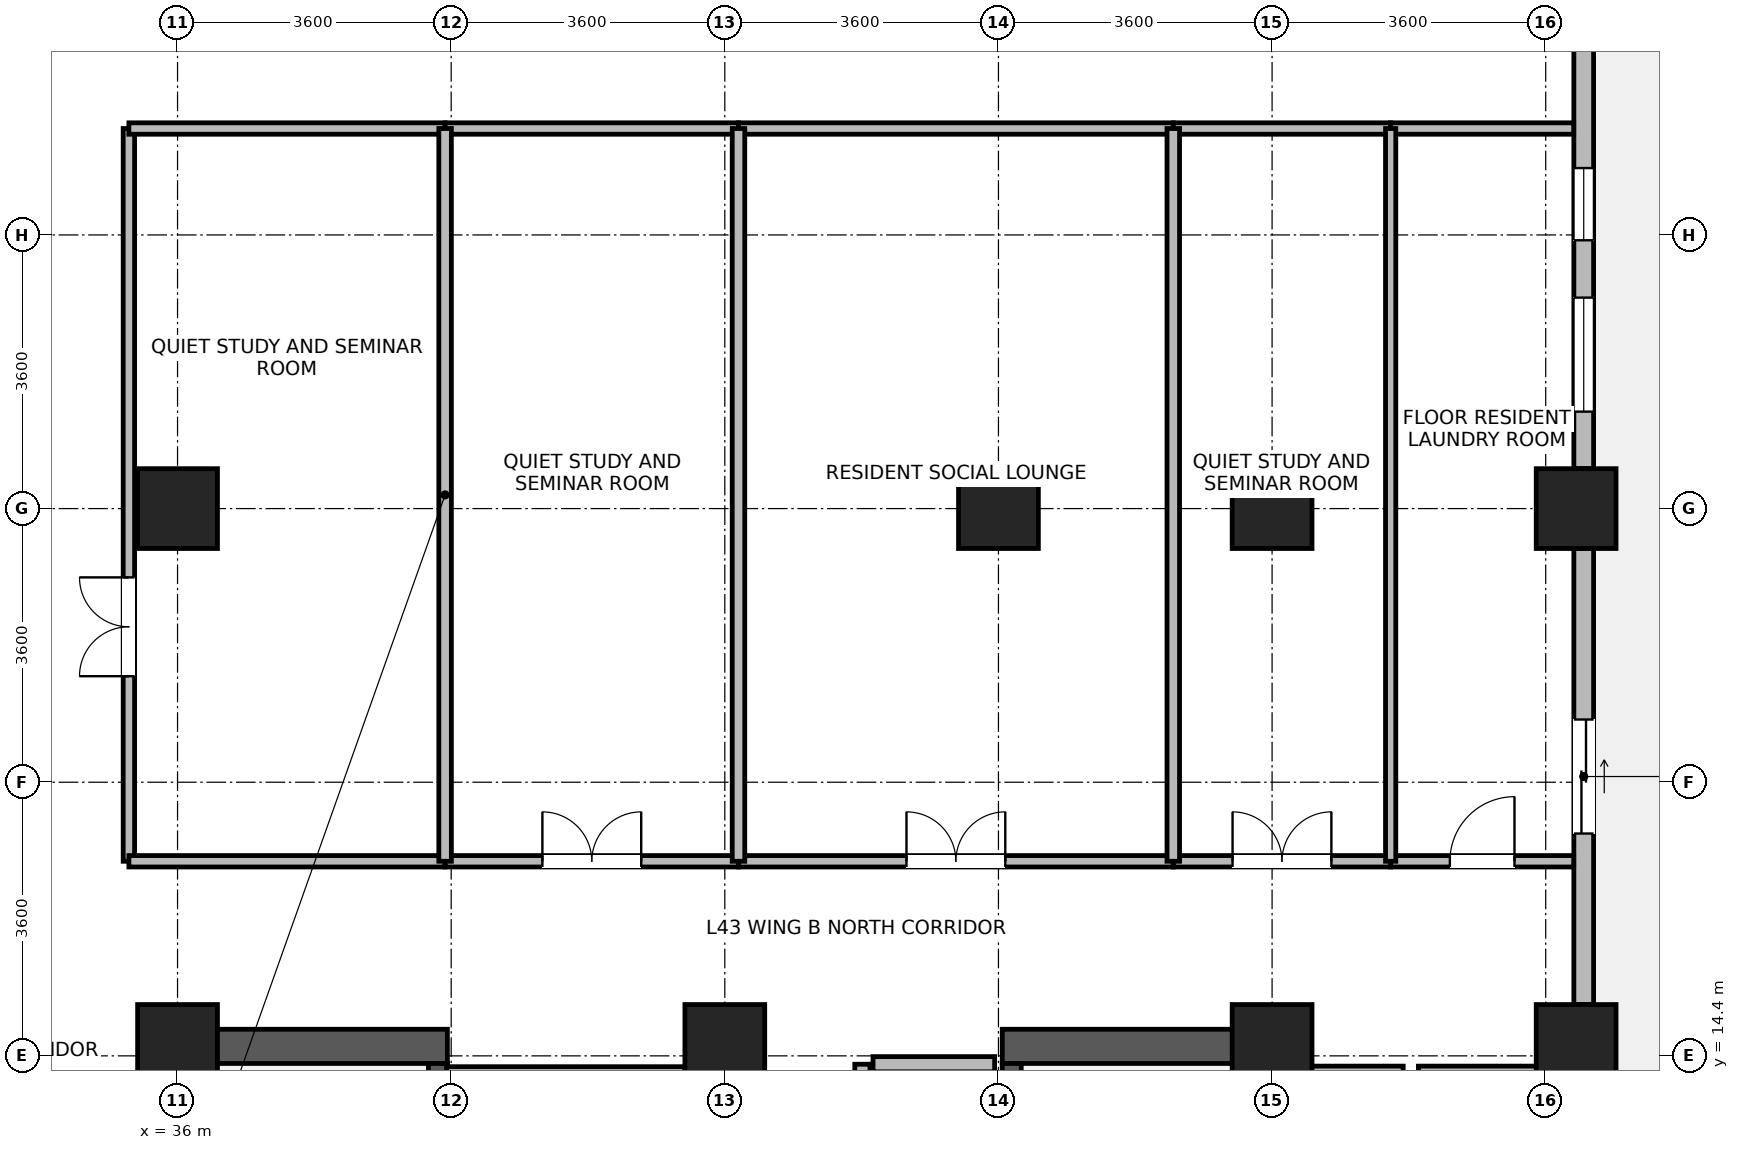
"""IFC4 building model, lengths in metres.
Left out: names, types, materials, properties, quantities, classifications, styles, units other than length and angle.
Written with IfcOpenShell. Run it as: python <this file> out.ifc"""

import sys

from ifc_helpers import new_model, si_unit, direction, frame, frame_2d, origin, origin_2d, place, context, subcontext, project, spatial, rectangle, extrude, source, transform, mapped, element, fill, save


model = new_model("IFC4")
c1 = context("Model", 3, precision=1e-05, world=origin(), true_north=direction((0.0, 1.0)))
c2 = subcontext(c1, "Body", "Model", "MODEL_VIEW")
j1 = project(units=[si_unit("LENGTHUNIT", "METRE"), si_unit("PLANEANGLEUNIT", "RADIAN")], contexts=[c1])
p1 = place(None, origin())
s1 = spatial("IfcSite", under=j1, at=p1, CompositionType="ELEMENT")
p2 = place(p1, origin())
s2 = spatial("IfcBuilding", under=s1, at=p2, CompositionType="ELEMENT")
p3 = place(p2, frame((0.0, 0.0, 169.8)))
s3 = spatial("IfcBuildingStorey", under=s2, at=p3, CompositionType="ELEMENT", Elevation=169.8)
for number, where, z_axis, x_axis in (
    (1, (36.125, 6.85, 0.0), (0.0, 0.0, 1.0), (0.0, 1.0, 0.0)),
    (2, (50.275, 6.85, 0.0), (0.0, 0.0, 1.0), (0.0, 1.0, 0.0)),
):
    element("IfcWall", number, at=place(p3, frame(where, z_axis=z_axis, x_axis=x_axis)), inside=s3, PredefinedType="SHEAR", context=c2, shape_type="SweptSolid", body=[
        extrude(rectangle(XDim=7.9, YDim=0.45, at=frame_2d((3.95, 0.0))), origin(), (0.0, 0.0, 1.0), 3.46),
    ])
for number, where, z_axis, x_axis in (
    (3, (36.35, 14.525, 0.0), (0.0, 0.0, 1.0), (1.0, 0.0, 0.0)),
    (4, (46.85, 14.525, 0.0), (0.0, 0.0, 1.0), (1.0, 0.0, 0.0)),
):
    element("IfcWall", number, at=place(p3, frame(where, z_axis=z_axis, x_axis=x_axis)), inside=s3, PredefinedType="SHEAR", context=c2, shape_type="SweptSolid", body=[
        extrude(rectangle(XDim=3.2, YDim=0.45, at=frame_2d((1.6, 0.0))), origin(), (0.0, 0.0, 1.0), 3.46),
    ])
p4 = place(p3, frame((39.425, 7.3, 0.0), z_axis=(0.0, 0.0, 1.0), x_axis=(0.0, 1.0, 0.0)))
e5 = element("IfcWall", 5, at=p4, inside=s3, PredefinedType="SHEAR", context=c2, shape_type="SweptSolid", body=[
    extrude(rectangle(XDim=7.0, YDim=0.25, at=frame_2d((3.5, 0.0))), origin(), (0.0, 0.0, 1.0), 3.46),
])
p5 = place(p4, frame((0.15, 0.0, 0.0)))
e6 = element("IfcOpeningElement", 6, at=p5, cuts=e5, PredefinedType="OPENING", context=c2, shape_type="SweptSolid", body=[
    extrude(rectangle(XDim=1.1, YDim=2.08, at=frame_2d((0.55, 1.04))), frame((0.0, 0.135, 0.0), z_axis=(0.0, -1.0, 0.0), x_axis=(1.0, 0.0, 0.0)), (0.0, 0.0, 1.0), 0.27),
])
p6 = place(p3, frame((46.975, 7.3, 0.0), z_axis=(0.0, 0.0, 1.0), x_axis=(0.0, 1.0, 0.0)))
e7 = element("IfcWall", 7, at=p6, inside=s3, PredefinedType="SHEAR", context=c2, shape_type="SweptSolid", body=[
    extrude(rectangle(XDim=7.0, YDim=0.25, at=frame_2d((3.5, 0.0))), origin(), (0.0, 0.0, 1.0), 3.46),
])
p7 = place(p6, frame((0.15, 0.0, 0.0)))
e8 = element("IfcOpeningElement", 8, at=p7, cuts=e7, PredefinedType="OPENING", context=c2, shape_type="SweptSolid", body=[
    extrude(rectangle(XDim=1.1, YDim=2.08, at=frame_2d((0.55, 1.04))), frame((0.0, 0.135, 0.0), z_axis=(0.0, -1.0, 0.0), x_axis=(1.0, 0.0, 0.0)), (0.0, 0.0, 1.0), 0.27),
])
m1 = source(origin(), c2, "Body", "SweptSolid", [
    extrude(rectangle(XDim=1.05, YDim=1.05, at=origin_2d()), origin(), (0.0, 0.0, 1.0), 3.7),
])
for number, where, z_axis, x_axis in (
    (9, (36.0, 21.6, 0.0), (0.0, 0.0, 1.0), (1.0, 0.0, 0.0)),
    (10, (46.8, 21.6, 0.0), (0.0, 0.0, 1.0), (1.0, 0.0, 0.0)),
    (11, (36.0, 14.55, 0.0), (0.0, 0.0, 1.0), (1.0, 0.0, 0.0)),
    (12, (43.2, 14.55, 0.0), (0.0, 0.0, 1.0), (1.0, 0.0, 0.0)),
    (13, (50.4, 14.55, 0.0), (0.0, 0.0, 1.0), (1.0, 0.0, 0.0)),
    (14, (50.4, 21.6, 0.0), (0.0, 0.0, 1.0), (1.0, 0.0, 0.0)),
    (15, (54.4, 14.55, 0.0), (0.0, 0.0, 1.0), (1.0, 0.0, 0.0)),
    (16, (54.4, 21.6, 0.0), (0.0, 0.0, 1.0), (1.0, 0.0, 0.0)),
):
    element("IfcColumn", number, at=place(p3, frame(where, z_axis=z_axis, x_axis=x_axis)), inside=s3, PredefinedType="COLUMN", context=c2, shape_type="MappedRepresentation", body=[
        mapped(m1, transform((0.0, 0.0, 0.0), x_axis=(1.0, 0.0, 0.0), y_axis=(0.0, 1.0, 0.0), z_axis=(0.0, 0.0, 1.0), scale=1.0)),
    ])
p8 = place(p3, frame((54.5, 21.074, 0.0), z_axis=(0.0, 0.0, 1.0), x_axis=(0.0, -1.0, 0.0)))
e17 = element("IfcWall", 17, at=p8, inside=s3, PredefinedType="STANDARD", context=c2, shape_type="SweptSolid", body=[
    extrude(rectangle(XDim=5.998, YDim=0.26, at=frame_2d((2.999, 0.0))), origin(), (0.0, 0.0, 1.0), 2.99),
])
p9 = place(p8, frame((2.249, 0.0, 0.0)))
e18 = element("IfcOpeningElement", 18, at=p9, cuts=e17, PredefinedType="OPENING", context=c2, shape_type="SweptSolid", body=[
    extrude(rectangle(XDim=1.5, YDim=2.15, at=frame_2d((0.75, 1.075))), frame((0.0, 0.14, 0.0), z_axis=(0.0, -1.0, 0.0), x_axis=(1.0, 0.0, 0.0)), (0.0, 0.0, 1.0), 0.28),
])
p10 = place(p3, frame((54.5, 28.124, 0.0), z_axis=(0.0, 0.0, 1.0), x_axis=(0.0, -1.0, 0.0)))
e19 = element("IfcWall", 19, at=p10, inside=s3, PredefinedType="STANDARD", context=c2, shape_type="SweptSolid", body=[
    extrude(rectangle(XDim=5.998, YDim=0.26, at=frame_2d((2.999, 0.0))), origin(), (0.0, 0.0, 1.0), 2.99),
])
p11 = place(p10, frame((3.749, 0.0, 0.85)))
e20 = element("IfcOpeningElement", 20, at=p11, cuts=e19, PredefinedType="OPENING", context=c2, shape_type="SweptSolid", body=[
    extrude(rectangle(XDim=1.5, YDim=1.85, at=frame_2d((0.75, 0.925))), frame((0.0, 0.14, 0.0), z_axis=(0.0, -1.0, 0.0), x_axis=(1.0, 0.0, 0.0)), (0.0, 0.0, 1.0), 0.28),
])
p12 = place(p10, frame((2.044, 0.0, 0.85)))
e21 = element("IfcOpeningElement", 21, at=p12, cuts=e19, PredefinedType="OPENING", context=c2, shape_type="SweptSolid", body=[
    extrude(rectangle(XDim=0.95, YDim=1.75, at=frame_2d((0.475, 0.875))), frame((0.0, 0.14, 0.0), z_axis=(0.0, -1.0, 0.0), x_axis=(1.0, 0.0, 0.0)), (0.0, 0.0, 1.0), 0.28),
])
p13 = place(p3, frame((50.475, 14.165, 0.0), z_axis=(0.0, 0.0, 1.0), x_axis=(1.0, 0.0, 0.0)))
e22 = element("IfcWall", 22, at=p13, inside=s3, PredefinedType="PARTITIONING", context=c2, shape_type="SweptSolid", body=[
    extrude(rectangle(XDim=1.65, YDim=0.2, at=frame_2d((0.825, 0.0))), origin(), (0.0, 0.0, 1.0), 3.44),
])
p14 = place(p3, frame((52.325, 14.165, 0.0), z_axis=(0.0, 0.0, 1.0), x_axis=(1.0, 0.0, 0.0)))
e23 = element("IfcWall", 23, at=p14, inside=s3, PredefinedType="PARTITIONING", context=c2, shape_type="SweptSolid", body=[
    extrude(rectangle(XDim=1.65, YDim=0.2, at=frame_2d((0.825, 0.0))), origin(), (0.0, 0.0, 1.0), 3.44),
])
p15 = place(p3, frame((45.15, 14.29, 0.0), z_axis=(0.0, 0.0, 1.0), x_axis=(1.0, 0.0, 0.0)))
e24 = element("IfcWall", 24, at=p15, inside=s3, PredefinedType="PARTITIONING", context=c2, shape_type="SweptSolid", body=[
    extrude(rectangle(XDim=1.6, YDim=0.2, at=frame_2d((0.8, 0.0))), origin(), (0.0, 0.0, 1.0), 2.44),
])
p16 = place(p3, frame((45.01, 11.61, 0.0), z_axis=(0.0, 0.0, 1.0), x_axis=(0.0, 1.0, 0.0)))
e25 = element("IfcWall", 25, at=p16, inside=s3, PredefinedType="PARTITIONING", context=c2, shape_type="SweptSolid", body=[
    extrude(rectangle(XDim=2.68, YDim=0.2, at=frame_2d((1.34, 0.0))), origin(), (0.0, 0.0, 1.0), 3.44),
])
p17 = place(p3, frame((35.36, 16.96, 0.0), z_axis=(0.0, 0.0, 1.0), x_axis=(0.0, 1.0, 0.0)))
e26 = element("IfcWall", 26, at=p17, inside=s3, PredefinedType="PARTITIONING", context=c2, shape_type="SweptSolid", body=[
    extrude(rectangle(XDim=9.64, YDim=0.15, at=frame_2d((4.82, 0.0))), origin(), (0.0, 0.0, 1.0), 3.44),
])
p18 = place(p17, frame((2.435, 0.0, 0.0)))
e27 = element("IfcOpeningElement", 27, at=p18, cuts=e26, PredefinedType="OPENING", context=c2, shape_type="SweptSolid", body=[
    extrude(rectangle(XDim=1.3, YDim=2.12, at=frame_2d((0.65, 1.06))), frame((0.0, 0.085, 0.0), z_axis=(0.0, -1.0, 0.0), x_axis=(1.0, 0.0, 0.0)), (0.0, 0.0, 1.0), 0.17),
])
p19 = place(p3, frame((43.38, 16.96, 0.0), z_axis=(0.0, 0.0, 1.0), x_axis=(1.0, 0.0, 0.0)))
e28 = element("IfcWall", 28, at=p19, inside=s3, PredefinedType="PARTITIONING", context=c2, shape_type="SweptSolid", body=[
    extrude(rectangle(XDim=5.72, YDim=0.15, at=frame_2d((2.86, 0.0))), origin(), (0.0, 0.0, 1.0), 3.44),
])
p20 = place(p19, frame((2.21, 0.0, 0.0)))
e29 = element("IfcOpeningElement", 29, at=p20, cuts=e28, PredefinedType="OPENING", context=c2, shape_type="SweptSolid", body=[
    extrude(rectangle(XDim=1.3, YDim=2.12, at=frame_2d((0.65, 1.06))), frame((0.0, 0.085, 0.0), z_axis=(0.0, -1.0, 0.0), x_axis=(1.0, 0.0, 0.0)), (0.0, 0.0, 1.0), 0.17),
])
p21 = place(p3, frame((43.38, 26.6, 0.0), z_axis=(0.0, 0.0, 1.0), x_axis=(1.0, 0.0, 0.0)))
e30 = element("IfcWall", 30, at=p21, inside=s3, PredefinedType="PARTITIONING", context=c2, shape_type="SweptSolid", body=[
    extrude(rectangle(XDim=5.72, YDim=0.15, at=frame_2d((2.86, 0.0))), origin(), (0.0, 0.0, 1.0), 3.44),
])
for number, where, z_axis, x_axis in (
    (31, (35.36, 16.96, 0.0), (0.0, 0.0, 1.0), (1.0, 0.0, 0.0)),
    (32, (35.36, 26.6, 0.0), (0.0, 0.0, 1.0), (1.0, 0.0, 0.0)),
):
    element("IfcWall", number, at=place(p3, frame(where, z_axis=z_axis, x_axis=x_axis)), inside=s3, PredefinedType="PARTITIONING", context=c2, shape_type="SweptSolid", body=[
        extrude(rectangle(XDim=4.16, YDim=0.15, at=frame_2d((2.08, 0.0))), origin(), (0.0, 0.0, 1.0), 3.44),
    ])
p22 = place(p3, frame((39.52, 16.96, 0.0), z_axis=(0.0, 0.0, 1.0), x_axis=(1.0, 0.0, 0.0)))
e33 = element("IfcWall", 33, at=p22, inside=s3, PredefinedType="PARTITIONING", context=c2, shape_type="SweptSolid", body=[
    extrude(rectangle(XDim=3.86, YDim=0.15, at=frame_2d((1.93, 0.0))), origin(), (0.0, 0.0, 1.0), 3.44),
])
p23 = place(p22, frame((1.28, 0.0, 0.0)))
e34 = element("IfcOpeningElement", 34, at=p23, cuts=e33, PredefinedType="OPENING", context=c2, shape_type="SweptSolid", body=[
    extrude(rectangle(XDim=1.3, YDim=2.12, at=frame_2d((0.65, 1.06))), frame((0.0, 0.085, 0.0), z_axis=(0.0, -1.0, 0.0), x_axis=(1.0, 0.0, 0.0)), (0.0, 0.0, 1.0), 0.17),
])
p24 = place(p3, frame((39.52, 26.6, 0.0), z_axis=(0.0, 0.0, 1.0), x_axis=(1.0, 0.0, 0.0)))
e35 = element("IfcWall", 35, at=p24, inside=s3, PredefinedType="PARTITIONING", context=c2, shape_type="SweptSolid", body=[
    extrude(rectangle(XDim=3.86, YDim=0.15, at=frame_2d((1.93, 0.0))), origin(), (0.0, 0.0, 1.0), 3.44),
])
p25 = place(p3, frame((49.1, 16.96, 0.0), z_axis=(0.0, 0.0, 1.0), x_axis=(1.0, 0.0, 0.0)))
e36 = element("IfcWall", 36, at=p25, inside=s3, PredefinedType="PARTITIONING", context=c2, shape_type="SweptSolid", body=[
    extrude(rectangle(XDim=2.86, YDim=0.15, at=frame_2d((1.43, 0.0))), origin(), (0.0, 0.0, 1.0), 3.44),
])
p26 = place(p25, frame((0.78, 0.0, 0.0)))
e37 = element("IfcOpeningElement", 37, at=p26, cuts=e36, PredefinedType="OPENING", context=c2, shape_type="SweptSolid", body=[
    extrude(rectangle(XDim=1.3, YDim=2.12, at=frame_2d((0.65, 1.06))), frame((0.0, 0.085, 0.0), z_axis=(0.0, -1.0, 0.0), x_axis=(1.0, 0.0, 0.0)), (0.0, 0.0, 1.0), 0.17),
])
p27 = place(p3, frame((49.1, 26.6, 0.0), z_axis=(0.0, 0.0, 1.0), x_axis=(1.0, 0.0, 0.0)))
e38 = element("IfcWall", 38, at=p27, inside=s3, PredefinedType="PARTITIONING", context=c2, shape_type="SweptSolid", body=[
    extrude(rectangle(XDim=2.86, YDim=0.15, at=frame_2d((1.43, 0.0))), origin(), (0.0, 0.0, 1.0), 3.44),
])
p28 = place(p3, frame((51.96, 16.96, 0.0), z_axis=(0.0, 0.0, 1.0), x_axis=(1.0, 0.0, 0.0)))
e39 = element("IfcWall", 39, at=p28, inside=s3, PredefinedType="PARTITIONING", context=c2, shape_type="SweptSolid", body=[
    extrude(rectangle(XDim=2.408, YDim=0.15, at=frame_2d((1.204, 0.0))), origin(), (0.0, 0.0, 1.0), 3.44),
])
p29 = place(p28, frame((0.779, 0.0, 0.0)))
e40 = element("IfcOpeningElement", 40, at=p29, cuts=e39, PredefinedType="OPENING", context=c2, shape_type="SweptSolid", body=[
    extrude(rectangle(XDim=0.85, YDim=2.04, at=frame_2d((0.425, 1.02))), frame((0.0, 0.085, 0.0), z_axis=(0.0, -1.0, 0.0), x_axis=(1.0, 0.0, 0.0)), (0.0, 0.0, 1.0), 0.17),
])
p30 = place(p3, frame((51.96, 26.6, 0.0), z_axis=(0.0, 0.0, 1.0), x_axis=(1.0, 0.0, 0.0)))
e41 = element("IfcWall", 41, at=p30, inside=s3, PredefinedType="PARTITIONING", context=c2, shape_type="SweptSolid", body=[
    extrude(rectangle(XDim=2.408, YDim=0.15, at=frame_2d((1.204, 0.0))), origin(), (0.0, 0.0, 1.0), 3.44),
])
for number, where, z_axis, x_axis in (
    (42, (39.52, 16.96, 0.0), (0.0, 0.0, 1.0), (0.0, 1.0, 0.0)),
    (43, (43.38, 16.96, 0.0), (0.0, 0.0, 1.0), (0.0, 1.0, 0.0)),
    (44, (49.1, 16.96, 0.0), (0.0, 0.0, 1.0), (0.0, 1.0, 0.0)),
):
    element("IfcWall", number, at=place(p3, frame(where, z_axis=z_axis, x_axis=x_axis)), inside=s3, PredefinedType="PARTITIONING", context=c2, shape_type="SweptSolid", body=[
        extrude(rectangle(XDim=9.64, YDim=0.165, at=frame_2d((4.82, 0.0))), origin(), (0.0, 0.0, 1.0), 3.44),
    ])
p31 = place(p3, frame((51.96, 16.96, 0.0), z_axis=(0.0, 0.0, 1.0), x_axis=(0.0, 1.0, 0.0)))
e45 = element("IfcWall", 45, at=p31, inside=s3, PredefinedType="PARTITIONING", context=c2, shape_type="SweptSolid", body=[
    extrude(rectangle(XDim=9.64, YDim=0.135, at=frame_2d((4.82, 0.0))), origin(), (0.0, 0.0, 1.0), 3.44),
])
p32 = place(p3, frame((39.54, 14.2, 0.0), z_axis=(0.0, 0.0, 1.0), x_axis=(1.0, 0.0, 0.0)))
e46 = element("IfcWall", 46, at=p32, inside=s3, PredefinedType="PARTITIONING", context=c2, shape_type="SweptSolid", body=[
    extrude(rectangle(XDim=3.135, YDim=0.115, at=frame_2d((1.567, 0.0))), origin(), (0.0, 0.0, 1.0), 2.44),
])
p33 = place(p9, origin())
e47 = element("IfcDoor", 47, at=p33, inside=s3, OperationType="SLIDING_TO_LEFT", PredefinedType="DOOR", context=c2, shape_type="SweptSolid", body=[
    extrude(rectangle(XDim=1.5, YDim=2.15, at=frame_2d((0.75, 1.075))), frame((0.0, 0.025, 0.0), z_axis=(0.0, -1.0, 0.0), x_axis=(1.0, 0.0, 0.0)), (0.0, 0.0, 1.0), 0.05),
])
fill(e18, e47)
p34 = place(p11, origin())
e48 = element("IfcWindow", 48, at=p34, inside=s3, PartitioningType="SINGLE_PANEL", PredefinedType="WINDOW", context=c2, shape_type="SweptSolid", body=[
    extrude(rectangle(XDim=1.5, YDim=1.85, at=frame_2d((0.75, 0.925))), frame((0.0, 0.03, 0.0), z_axis=(0.0, -1.0, 0.0), x_axis=(1.0, 0.0, 0.0)), (0.0, 0.0, 1.0), 0.06),
])
fill(e20, e48)
p35 = place(p12, origin())
e49 = element("IfcWindow", 49, at=p35, inside=s3, PartitioningType="SINGLE_PANEL", PredefinedType="WINDOW", context=c2, shape_type="SweptSolid", body=[
    extrude(rectangle(XDim=0.95, YDim=1.75, at=frame_2d((0.475, 0.875))), frame((0.0, 0.03, 0.0), z_axis=(0.0, -1.0, 0.0), x_axis=(1.0, 0.0, 0.0)), (0.0, 0.0, 1.0), 0.06),
])
fill(e21, e49)
p36 = place(p18, origin())
e50 = element("IfcDoor", 50, at=p36, inside=s3, OperationType="DOUBLE_DOOR_SINGLE_SWING", PredefinedType="DOOR", context=c2, shape_type="SweptSolid", body=[
    extrude(rectangle(XDim=1.3, YDim=2.12, at=frame_2d((0.65, 1.06))), frame((0.0, 0.025, 0.0), z_axis=(0.0, -1.0, 0.0), x_axis=(1.0, 0.0, 0.0)), (0.0, 0.0, 1.0), 0.05),
])
fill(e27, e50)
p37 = place(p20, origin())
e51 = element("IfcDoor", 51, at=p37, inside=s3, OperationType="DOUBLE_DOOR_SINGLE_SWING", PredefinedType="DOOR", context=c2, shape_type="SweptSolid", body=[
    extrude(rectangle(XDim=1.3, YDim=2.12, at=frame_2d((0.65, 1.06))), frame((0.0, 0.025, 0.0), z_axis=(0.0, -1.0, 0.0), x_axis=(1.0, 0.0, 0.0)), (0.0, 0.0, 1.0), 0.05),
])
fill(e29, e51)
p38 = place(p23, origin())
e52 = element("IfcDoor", 52, at=p38, inside=s3, OperationType="DOUBLE_DOOR_SINGLE_SWING", PredefinedType="DOOR", context=c2, shape_type="SweptSolid", body=[
    extrude(rectangle(XDim=1.3, YDim=2.12, at=frame_2d((0.65, 1.06))), frame((0.0, 0.025, 0.0), z_axis=(0.0, -1.0, 0.0), x_axis=(1.0, 0.0, 0.0)), (0.0, 0.0, 1.0), 0.05),
])
fill(e34, e52)
p39 = place(p26, origin())
e53 = element("IfcDoor", 53, at=p39, inside=s3, OperationType="DOUBLE_DOOR_SINGLE_SWING", PredefinedType="DOOR", context=c2, shape_type="SweptSolid", body=[
    extrude(rectangle(XDim=1.3, YDim=2.12, at=frame_2d((0.65, 1.06))), frame((0.0, 0.025, 0.0), z_axis=(0.0, -1.0, 0.0), x_axis=(1.0, 0.0, 0.0)), (0.0, 0.0, 1.0), 0.05),
])
fill(e37, e53)
p40 = place(p29, origin())
e54 = element("IfcDoor", 54, at=p40, inside=s3, OperationType="SINGLE_SWING_RIGHT", PredefinedType="DOOR", context=c2, shape_type="SweptSolid", body=[
    extrude(rectangle(XDim=0.85, YDim=2.04, at=frame_2d((0.425, 1.02))), frame((0.0, 0.025, 0.0), z_axis=(0.0, -1.0, 0.0), x_axis=(1.0, 0.0, 0.0)), (0.0, 0.0, 1.0), 0.05),
])
fill(e40, e54)
save(model, sys.argv[1])
